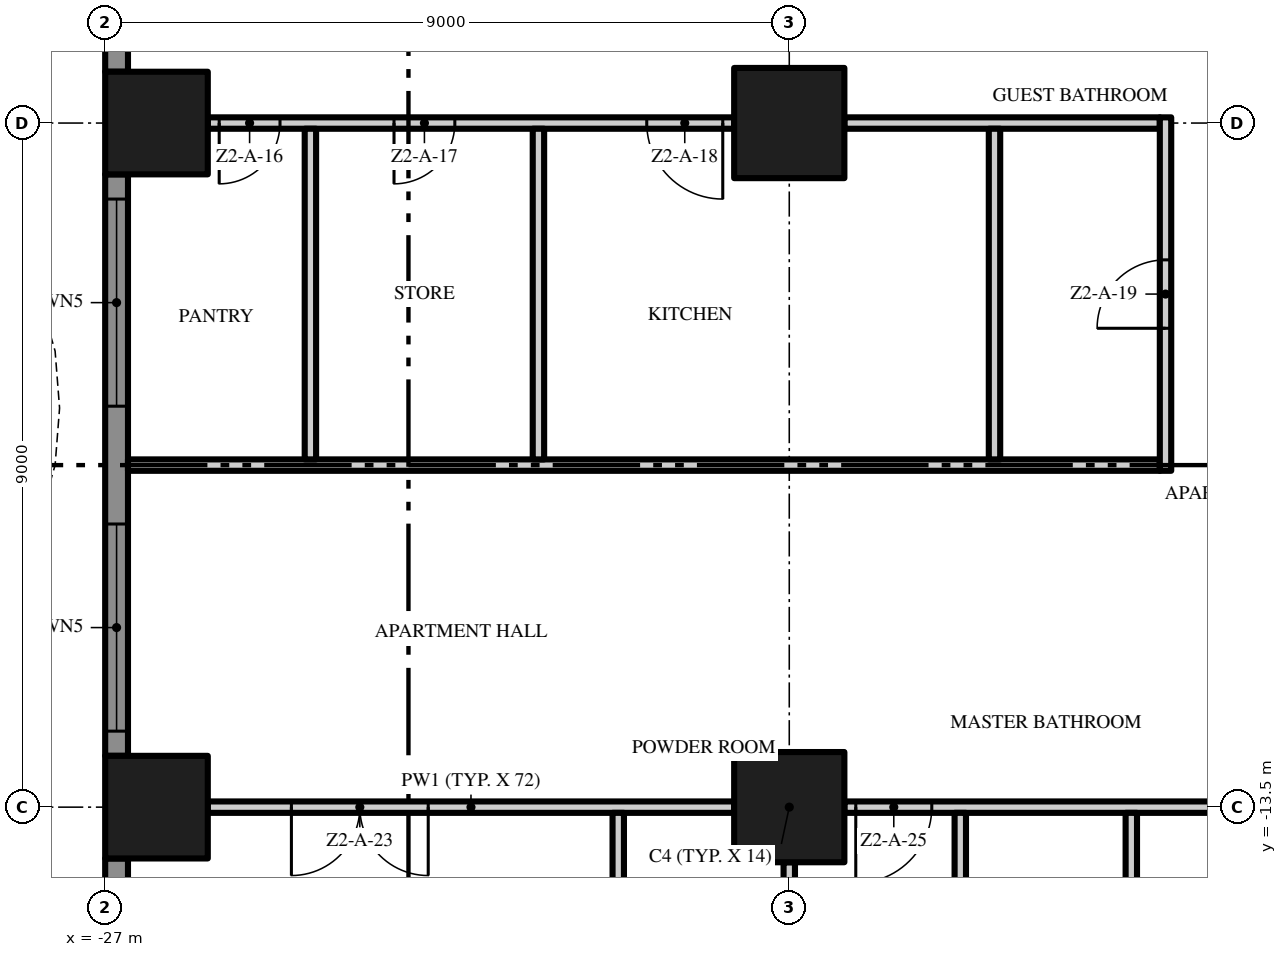
"""IFC4 building model, lengths in metres.
Left out: names, types, materials, properties, quantities, classifications, styles, units other than length and angle.
Written with IfcOpenShell. Run it as: python <this file> out.ifc"""

import sys

from ifc_helpers import new_model, si_unit, direction, frame, frame_2d, origin, origin_2d, place, context, subcontext, project, spatial, polyline, rectangle, outline, extrude, element, fill, save


model = new_model("IFC4")
c1 = context("Model", 3, precision=1e-05, world=origin(), true_north=direction((0.0, 1.0)))
c2 = subcontext(c1, "Body", "Model", "MODEL_VIEW")
j1 = project(units=[si_unit("LENGTHUNIT", "METRE"), si_unit("PLANEANGLEUNIT", "RADIAN")], contexts=[c1])
p1 = place(None, origin())
s1 = spatial("IfcSite", under=j1, at=p1, CompositionType="ELEMENT")
p2 = place(p1, origin())
s2 = spatial("IfcBuilding", under=s1, at=p2, CompositionType="ELEMENT")
p3 = place(p2, frame((0.0, 0.0, 77.0)))
s3 = spatial("IfcBuildingStorey", under=s2, at=p3, CompositionType="ELEMENT", Elevation=77.0)
for number, where, z_axis, x_axis in (
    (1, (-18.0, -13.5, 0.0), (0.0, 0.0, 1.0), (1.0, 0.0, 0.0)),
    (2, (-18.0, -4.5, 0.0), (0.0, 0.0, 1.0), (1.0, 0.0, 0.0)),
):
    element("IfcColumn", number, at=place(p3, frame(where, z_axis=z_axis, x_axis=x_axis)), inside=s3, PredefinedType="COLUMN", context=c2, shape_type="SweptSolid", body=[
        extrude(rectangle(XDim=1.45, YDim=1.45, at=origin_2d()), origin(), (0.0, 0.0, 1.0), 3.5),
    ])
for number, where, z_axis, x_axis in (
    (3, (-26.325, -13.5, 0.0), (0.0, 0.0, 1.0), (1.0, 0.0, 0.0)),
    (4, (-26.325, -4.5, 0.0), (0.0, 0.0, 1.0), (1.0, 0.0, 0.0)),
):
    element("IfcColumn", number, at=place(p3, frame(where, z_axis=z_axis, x_axis=x_axis)), inside=s3, PredefinedType="COLUMN", context=c2, shape_type="SweptSolid", body=[
        extrude(rectangle(XDim=1.35, YDim=1.35, at=origin_2d()), origin(), (0.0, 0.0, 1.0), 3.5),
    ])
p4 = place(p3, frame((-26.85, -3.825, 0.0), z_axis=(0.0, 0.0, 1.0), x_axis=(0.0, 1.0, 0.0)))
e5 = element("IfcWall", 5, at=p4, inside=s3, PredefinedType="SOLIDWALL", context=c2, shape_type="SweptSolid", body=[
    extrude(rectangle(XDim=7.65, YDim=0.3, at=frame_2d((3.825, 0.0))), origin(), (0.0, 0.0, 1.0), 3.5),
])
p5 = place(p4, frame((4.6, 0.0, 0.45)))
e6 = element("IfcOpeningElement", 6, at=p5, cuts=e5, PredefinedType="OPENING", context=c2, shape_type="SweptSolid", body=[
    extrude(rectangle(XDim=2.725, YDim=2.65, at=frame_2d((1.363, 1.325))), frame((0.0, 0.16, 0.0), z_axis=(0.0, -1.0, 0.0), x_axis=(1.0, 0.0, 0.0)), (0.0, 0.0, 1.0), 0.32),
])
p6 = place(p4, frame((0.325, 0.0, 0.0)))
e7 = element("IfcOpeningElement", 7, at=p6, cuts=e5, PredefinedType="OPENING", context=c2, shape_type="SweptSolid", body=[
    extrude(rectangle(XDim=2.725, YDim=2.4, at=frame_2d((1.363, 1.2))), frame((0.0, 0.16, 0.0), z_axis=(0.0, -1.0, 0.0), x_axis=(1.0, 0.0, 0.0)), (0.0, 0.0, 1.0), 0.32),
])
p7 = place(p3, frame((-26.85, -12.825, 0.0), z_axis=(0.0, 0.0, 1.0), x_axis=(0.0, 1.0, 0.0)))
e8 = element("IfcWall", 8, at=p7, inside=s3, PredefinedType="SOLIDWALL", context=c2, shape_type="SweptSolid", body=[
    extrude(rectangle(XDim=7.65, YDim=0.3, at=frame_2d((3.825, 0.0))), origin(), (0.0, 0.0, 1.0), 3.5),
])
p8 = place(p7, frame((4.6, 0.0, 0.45)))
e9 = element("IfcOpeningElement", 9, at=p8, cuts=e8, PredefinedType="OPENING", context=c2, shape_type="SweptSolid", body=[
    extrude(rectangle(XDim=2.725, YDim=2.65, at=frame_2d((1.363, 1.325))), frame((0.0, 0.16, 0.0), z_axis=(0.0, -1.0, 0.0), x_axis=(1.0, 0.0, 0.0)), (0.0, 0.0, 1.0), 0.32),
])
p9 = place(p7, frame((0.325, 0.0, 0.45)))
e10 = element("IfcOpeningElement", 10, at=p9, cuts=e8, PredefinedType="OPENING", context=c2, shape_type="SweptSolid", body=[
    extrude(rectangle(XDim=2.725, YDim=2.65, at=frame_2d((1.363, 1.325))), frame((0.0, 0.16, 0.0), z_axis=(0.0, -1.0, 0.0), x_axis=(1.0, 0.0, 0.0)), (0.0, 0.0, 1.0), 0.32),
])
p10 = place(p3, frame((-26.85, -18.0, 0.0), z_axis=(0.0, 0.0, 1.0), x_axis=(0.0, 1.0, 0.0)))
e11 = element("IfcWall", 11, at=p10, inside=s3, PredefinedType="SOLIDWALL", context=c2, shape_type="SweptSolid", body=[
    extrude(rectangle(XDim=3.825, YDim=0.3, at=frame_2d((1.913, 0.0))), origin(), (0.0, 0.0, 1.0), 3.5),
])
p11 = place(p10, frame((0.775, 0.0, 0.0)))
e12 = element("IfcOpeningElement", 12, at=p11, cuts=e11, PredefinedType="OPENING", context=c2, shape_type="SweptSolid", body=[
    extrude(rectangle(XDim=2.725, YDim=2.4, at=frame_2d((1.363, 1.2))), frame((0.0, 0.16, 0.0), z_axis=(0.0, -1.0, 0.0), x_axis=(1.0, 0.0, 0.0)), (0.0, 0.0, 1.0), 0.32),
])
p12 = place(p3, origin())
e13 = element("IfcWall", 13, at=p12, inside=s3, PredefinedType="USERDEFINED", context=c2, shape_type="SweptSolid", body=[
    extrude(outline(polyline([(-28.8, 18.0), (-29.505, 16.5), (-29.941, 15.0), (-30.0, 14.25), (-29.941, 13.5), (-29.505, 12.0), (-28.8, 10.5), (-28.095, 9.0), (-27.659, 7.5), (-27.6, 6.75), (-27.659, 6.0), (-28.095, 4.5), (-28.8, 3.0), (-29.505, 1.5), (-29.941, 0.0), (-30.0, -0.75), (-29.941, -1.5), (-29.505, -3.0), (-28.8, -4.5), (-28.095, -6.0), (-27.659, -7.5), (-27.6, -8.25), (-27.659, -9.0), (-28.095, -10.5), (-28.8, -12.0), (-29.505, -13.5), (-29.941, -15.0), (-30.0, -15.75), (-29.941, -16.5), (-29.505, -18.0), (-29.265, -17.93), (-29.694, -16.455), (-29.749, -15.75), (-29.694, -15.045), (-29.271, -13.589), (-28.574, -12.106), (-27.86, -10.589), (-27.411, -9.045), (-27.349, -8.25), (-27.411, -7.455), (-27.86, -5.911), (-28.574, -4.394), (-29.271, -2.911), (-29.694, -1.455), (-29.749, -0.75), (-29.694, -0.045), (-29.271, 1.411), (-28.574, 2.894), (-27.86, 4.411), (-27.411, 5.955), (-27.349, 6.75), (-27.411, 7.545), (-27.86, 9.089), (-28.574, 10.606), (-29.271, 12.089), (-29.694, 13.545), (-29.749, 14.25), (-29.694, 14.955), (-29.271, 16.411), (-28.574, 17.894), (-28.8, 18.0)])), origin(), (0.0, 0.0, 1.0), 0.9),
])
p13 = place(p3, frame((-18.725, -13.5, 0.0), z_axis=(0.0, 0.0, 1.0), x_axis=(-1.0, 0.0, 0.0)))
e14 = element("IfcWall", 14, at=p13, inside=s3, PredefinedType="PARTITIONING", context=c2, shape_type="SweptSolid", body=[
    extrude(rectangle(XDim=6.925, YDim=0.15, at=frame_2d((3.462, 0.0))), origin(), (0.0, 0.0, 1.0), 3.5),
])
p14 = place(p13, frame((4.025, 0.0, 0.0)))
e15 = element("IfcOpeningElement", 15, at=p14, cuts=e14, PredefinedType="OPENING", context=c2, shape_type="SweptSolid", body=[
    extrude(rectangle(XDim=1.8, YDim=2.4, at=frame_2d((0.9, 1.2))), frame((0.0, 0.085, 0.0), z_axis=(0.0, -1.0, 0.0), x_axis=(1.0, 0.0, 0.0)), (0.0, 0.0, 1.0), 0.17),
])
p15 = place(p3, frame((-9.725, -13.5, 0.0), z_axis=(0.0, 0.0, 1.0), x_axis=(-1.0, 0.0, 0.0)))
e16 = element("IfcWall", 16, at=p15, inside=s3, PredefinedType="PARTITIONING", context=c2, shape_type="SweptSolid", body=[
    extrude(rectangle(XDim=7.55, YDim=0.15, at=frame_2d((3.775, 0.0))), origin(), (0.0, 0.0, 1.0), 3.5),
])
p16 = place(p15, frame((6.4, 0.0, 0.0)))
e17 = element("IfcOpeningElement", 17, at=p16, cuts=e16, PredefinedType="OPENING", context=c2, shape_type="SweptSolid", body=[
    extrude(rectangle(XDim=1.0, YDim=2.4, at=frame_2d((0.5, 1.2))), frame((0.0, 0.085, 0.0), z_axis=(0.0, -1.0, 0.0), x_axis=(1.0, 0.0, 0.0)), (0.0, 0.0, 1.0), 0.17),
])
p17 = place(p15, frame((0.15, 0.0, 0.0)))
e18 = element("IfcOpeningElement", 18, at=p17, cuts=e16, PredefinedType="OPENING", context=c2, shape_type="SweptSolid", body=[
    extrude(rectangle(XDim=1.0, YDim=2.4, at=frame_2d((0.5, 1.2))), frame((0.0, 0.085, 0.0), z_axis=(0.0, -1.0, 0.0), x_axis=(1.0, 0.0, 0.0)), (0.0, 0.0, 1.0), 0.17),
])
p18 = place(p3, frame((-26.7, -9.0, 0.0), z_axis=(0.0, 0.0, 1.0), x_axis=(1.0, 0.0, 0.0)))
e19 = element("IfcWall", 19, at=p18, inside=s3, PredefinedType="PARTITIONING", context=c2, shape_type="SweptSolid", body=[
    extrude(rectangle(XDim=13.575, YDim=0.15, at=frame_2d((6.787, 0.0))), origin(), (0.0, 0.0, 1.0), 3.5),
])
p19 = place(p3, frame((-18.725, -4.5, 0.0), z_axis=(0.0, 0.0, 1.0), x_axis=(-1.0, 0.0, 0.0)))
e20 = element("IfcWall", 20, at=p19, inside=s3, PredefinedType="PARTITIONING", context=c2, shape_type="SweptSolid", body=[
    extrude(rectangle(XDim=6.925, YDim=0.15, at=frame_2d((3.462, 0.0))), origin(), (0.0, 0.0, 1.0), 3.5),
])
p20 = place(p19, frame((5.975, 0.0, 0.0)))
e21 = element("IfcOpeningElement", 21, at=p20, cuts=e20, PredefinedType="OPENING", context=c2, shape_type="SweptSolid", body=[
    extrude(rectangle(XDim=0.8, YDim=2.0, at=frame_2d((0.4, 1.0))), frame((0.0, 0.085, 0.0), z_axis=(0.0, -1.0, 0.0), x_axis=(1.0, 0.0, 0.0)), (0.0, 0.0, 1.0), 0.17),
])
p21 = place(p19, frame((3.675, 0.0, 0.0)))
e22 = element("IfcOpeningElement", 22, at=p21, cuts=e20, PredefinedType="OPENING", context=c2, shape_type="SweptSolid", body=[
    extrude(rectangle(XDim=0.8, YDim=2.0, at=frame_2d((0.4, 1.0))), frame((0.0, 0.085, 0.0), z_axis=(0.0, -1.0, 0.0), x_axis=(1.0, 0.0, 0.0)), (0.0, 0.0, 1.0), 0.17),
])
p22 = place(p19, frame((0.15, 0.0, 0.0)))
e23 = element("IfcOpeningElement", 23, at=p22, cuts=e20, PredefinedType="OPENING", context=c2, shape_type="SweptSolid", body=[
    extrude(rectangle(XDim=1.0, YDim=2.4, at=frame_2d((0.5, 1.2))), frame((0.0, 0.085, 0.0), z_axis=(0.0, -1.0, 0.0), x_axis=(1.0, 0.0, 0.0)), (0.0, 0.0, 1.0), 0.17),
])
p23 = place(p3, frame((-17.275, -4.5, 0.0), z_axis=(0.0, 0.0, 1.0), x_axis=(1.0, 0.0, 0.0)))
e24 = element("IfcWall", 24, at=p23, inside=s3, PredefinedType="PARTITIONING", context=c2, shape_type="SweptSolid", body=[
    extrude(rectangle(XDim=4.15, YDim=0.15, at=frame_2d((2.075, 0.0))), origin(), (0.0, 0.0, 1.0), 3.5),
])
for number, where, z_axis, x_axis in (
    (25, (-24.3, -8.925, 0.0), (0.0, 0.0, 1.0), (0.0, 1.0, 0.0)),
    (26, (-21.3, -8.925, 0.0), (0.0, 0.0, 1.0), (0.0, 1.0, 0.0)),
):
    element("IfcWall", number, at=place(p3, frame(where, z_axis=z_axis, x_axis=x_axis)), inside=s3, PredefinedType="PARTITIONING", context=c2, shape_type="SweptSolid", body=[
        extrude(rectangle(XDim=4.35, YDim=0.15, at=frame_2d((2.175, 0.0))), origin(), (0.0, 0.0, 1.0), 3.5),
    ])
p24 = place(p3, frame((-20.25, -16.575, 0.0), z_axis=(0.0, 0.0, 1.0), x_axis=(0.0, 1.0, 0.0)))
e27 = element("IfcWall", 27, at=p24, inside=s3, PredefinedType="PARTITIONING", context=c2, shape_type="SweptSolid", body=[
    extrude(rectangle(XDim=3.0, YDim=0.15, at=frame_2d((1.5, 0.0))), origin(), (0.0, 0.0, 1.0), 3.5),
])
p25 = place(p3, frame((-18.0, -21.15, 0.0), z_axis=(0.0, 0.0, 1.0), x_axis=(0.0, 1.0, 0.0)))
e28 = element("IfcWall", 28, at=p25, inside=s3, PredefinedType="PARTITIONING", context=c2, shape_type="SweptSolid", body=[
    extrude(rectangle(XDim=6.925, YDim=0.15, at=frame_2d((3.462, 0.0))), origin(), (0.0, 0.0, 1.0), 3.5),
])
p26 = place(p3, frame((-15.75, -16.575, 0.0), z_axis=(0.0, 0.0, 1.0), x_axis=(0.0, 1.0, 0.0)))
e29 = element("IfcWall", 29, at=p26, inside=s3, PredefinedType="PARTITIONING", context=c2, shape_type="SweptSolid", body=[
    extrude(rectangle(XDim=3.0, YDim=0.15, at=frame_2d((1.5, 0.0))), origin(), (0.0, 0.0, 1.0), 3.5),
])
p27 = place(p3, frame((-15.3, -8.925, 0.0), z_axis=(0.0, 0.0, 1.0), x_axis=(0.0, 1.0, 0.0)))
e30 = element("IfcWall", 30, at=p27, inside=s3, PredefinedType="PARTITIONING", context=c2, shape_type="SweptSolid", body=[
    extrude(rectangle(XDim=4.35, YDim=0.15, at=frame_2d((2.175, 0.0))), origin(), (0.0, 0.0, 1.0), 3.5),
])
p28 = place(p3, frame((-13.5, -22.2, 0.0), z_axis=(0.0, 0.0, 1.0), x_axis=(0.0, 1.0, 0.0)))
e31 = element("IfcWall", 31, at=p28, inside=s3, PredefinedType="PARTITIONING", context=c2, shape_type="SweptSolid", body=[
    extrude(rectangle(XDim=8.625, YDim=0.15, at=frame_2d((4.312, 0.0))), origin(), (0.0, 0.0, 1.0), 3.5),
])
p29 = place(p3, frame((-13.05, -9.075, 0.0), z_axis=(0.0, 0.0, 1.0), x_axis=(0.0, 1.0, 0.0)))
e32 = element("IfcWall", 32, at=p29, inside=s3, PredefinedType="PARTITIONING", context=c2, shape_type="SweptSolid", body=[
    extrude(rectangle(XDim=4.65, YDim=0.15, at=frame_2d((2.325, 0.0))), origin(), (0.0, 0.0, 1.0), 3.5),
])
p30 = place(p29, frame((1.875, 0.0, 0.0)))
e33 = element("IfcOpeningElement", 33, at=p30, cuts=e32, PredefinedType="OPENING", context=c2, shape_type="SweptSolid", body=[
    extrude(rectangle(XDim=0.9, YDim=2.1, at=frame_2d((0.45, 1.05))), frame((0.0, 0.085, 0.0), z_axis=(0.0, -1.0, 0.0), x_axis=(1.0, 0.0, 0.0)), (0.0, 0.0, 1.0), 0.17),
])
p31 = place(p8, origin())
e34 = element("IfcWindow", 34, at=p31, inside=s3, PartitioningType="SINGLE_PANEL", PredefinedType="WINDOW", context=c2, shape_type="SweptSolid", body=[
    extrude(rectangle(XDim=2.725, YDim=2.65, at=frame_2d((1.363, 1.325))), frame((0.0, 0.03, 0.0), z_axis=(0.0, -1.0, 0.0), x_axis=(1.0, 0.0, 0.0)), (0.0, 0.0, 1.0), 0.06),
])
fill(e9, e34)
p32 = place(p9, origin())
e35 = element("IfcWindow", 35, at=p32, inside=s3, PartitioningType="SINGLE_PANEL", PredefinedType="WINDOW", context=c2, shape_type="SweptSolid", body=[
    extrude(rectangle(XDim=2.725, YDim=2.65, at=frame_2d((1.363, 1.325))), frame((0.0, 0.03, 0.0), z_axis=(0.0, -1.0, 0.0), x_axis=(1.0, 0.0, 0.0)), (0.0, 0.0, 1.0), 0.06),
])
fill(e10, e35)
p33 = place(p20, origin())
e36 = element("IfcDoor", 36, at=p33, inside=s3, OperationType="SINGLE_SWING_RIGHT", PredefinedType="DOOR", context=c2, shape_type="SweptSolid", body=[
    extrude(rectangle(XDim=0.8, YDim=2.0, at=frame_2d((0.4, 1.0))), frame((0.0, 0.025, 0.0), z_axis=(0.0, -1.0, 0.0), x_axis=(1.0, 0.0, 0.0)), (0.0, 0.0, 1.0), 0.05),
])
fill(e21, e36)
p34 = place(p21, origin())
e37 = element("IfcDoor", 37, at=p34, inside=s3, OperationType="SINGLE_SWING_RIGHT", PredefinedType="DOOR", context=c2, shape_type="SweptSolid", body=[
    extrude(rectangle(XDim=0.8, YDim=2.0, at=frame_2d((0.4, 1.0))), frame((0.0, 0.025, 0.0), z_axis=(0.0, -1.0, 0.0), x_axis=(1.0, 0.0, 0.0)), (0.0, 0.0, 1.0), 0.05),
])
fill(e22, e37)
p35 = place(p22, origin())
e38 = element("IfcDoor", 38, at=p35, inside=s3, OperationType="SINGLE_SWING_LEFT", PredefinedType="DOOR", context=c2, shape_type="SweptSolid", body=[
    extrude(rectangle(XDim=1.0, YDim=2.4, at=frame_2d((0.5, 1.2))), frame((0.0, 0.025, 0.0), z_axis=(0.0, -1.0, 0.0), x_axis=(1.0, 0.0, 0.0)), (0.0, 0.0, 1.0), 0.05),
])
fill(e23, e38)
p36 = place(p30, origin())
e39 = element("IfcDoor", 39, at=p36, inside=s3, OperationType="SINGLE_SWING_LEFT", PredefinedType="DOOR", context=c2, shape_type="SweptSolid", body=[
    extrude(rectangle(XDim=0.9, YDim=2.1, at=frame_2d((0.45, 1.05))), frame((0.0, 0.025, 0.0), z_axis=(0.0, -1.0, 0.0), x_axis=(1.0, 0.0, 0.0)), (0.0, 0.0, 1.0), 0.05),
])
fill(e33, e39)
p37 = place(p14, origin())
e40 = element("IfcDoor", 40, at=p37, inside=s3, OperationType="DOUBLE_DOOR_SINGLE_SWING", PredefinedType="DOOR", context=c2, shape_type="SweptSolid", body=[
    extrude(rectangle(XDim=1.8, YDim=2.4, at=frame_2d((0.9, 1.2))), frame((0.0, 0.025, 0.0), z_axis=(0.0, -1.0, 0.0), x_axis=(1.0, 0.0, 0.0)), (0.0, 0.0, 1.0), 0.05),
])
fill(e15, e40)
p38 = place(p16, origin())
e41 = element("IfcDoor", 41, at=p38, inside=s3, OperationType="SINGLE_SWING_RIGHT", PredefinedType="DOOR", context=c2, shape_type="SweptSolid", body=[
    extrude(rectangle(XDim=1.0, YDim=2.4, at=frame_2d((0.5, 1.2))), frame((0.0, 0.025, 0.0), z_axis=(0.0, -1.0, 0.0), x_axis=(1.0, 0.0, 0.0)), (0.0, 0.0, 1.0), 0.05),
])
fill(e17, e41)
save(model, sys.argv[1])
